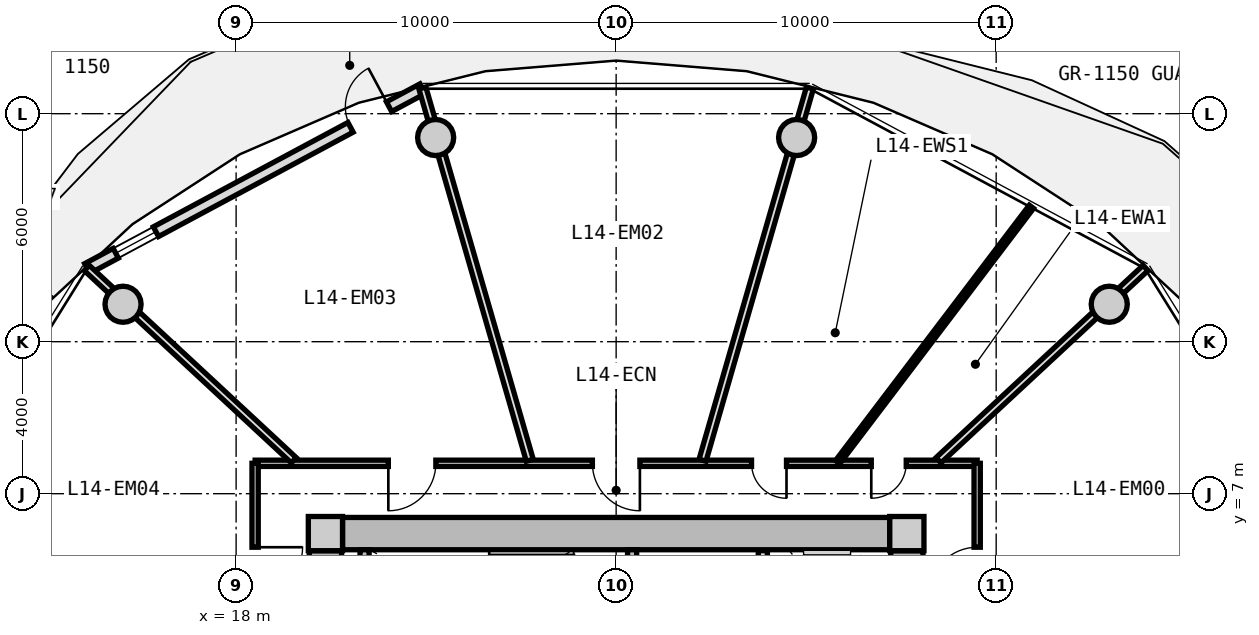
"""IFC4 building model, lengths in metres.
Left out: names, types, materials, properties, quantities, classifications, styles, units other than length and angle.
Written with IfcOpenShell. Run it as: python <this file> out.ifc"""

import sys

from ifc_helpers import new_model, si_unit, direction, frame, frame_2d, origin, origin_2d, place, context, subcontext, project, spatial, rectangle, circle, extrude, source, transform, mapped, element, fill, save


model = new_model("IFC4")
c1 = context("Model", 3, precision=1e-05, world=origin(), true_north=direction((0.0, 1.0)))
c2 = subcontext(c1, "Body", "Model", "MODEL_VIEW")
j1 = project(units=[si_unit("LENGTHUNIT", "METRE"), si_unit("PLANEANGLEUNIT", "RADIAN")], contexts=[c1])
p1 = place(None, origin())
s1 = spatial("IfcSite", under=j1, at=p1, CompositionType="ELEMENT")
p2 = place(p1, origin())
s2 = spatial("IfcBuilding", under=s1, at=p2, CompositionType="ELEMENT")
p3 = place(p2, frame((0.0, 0.0, 49.05)))
s3 = spatial("IfcBuildingStorey", under=s2, at=p3, CompositionType="ELEMENT", Elevation=49.05)
m1 = source(origin(), c2, "Body", "SweptSolid", [
    extrude(rectangle(XDim=0.9, YDim=0.9, at=origin_2d()), origin(), (0.0, 0.0, 1.0), 3.05),
])
for number, where, z_axis, x_axis in (
    (1, (35.65, 5.95, 0.0), (0.0, 0.0, 1.0), (1.0, 0.0, 0.0)),
    (2, (20.35, 5.95, 0.0), (0.0, 0.0, 1.0), (1.0, 0.0, 0.0)),
):
    element("IfcColumn", number, at=place(p3, frame(where, z_axis=z_axis, x_axis=x_axis)), inside=s3, PredefinedType="COLUMN", context=c2, shape_type="MappedRepresentation", body=[
        mapped(m1, transform((0.0, 0.0, 0.0), x_axis=(1.0, 0.0, 0.0), y_axis=(0.0, 1.0, 0.0), z_axis=(0.0, 0.0, 1.0), scale=1.0)),
    ])
m2 = source(origin(), c2, "Body", "SweptSolid", [
    extrude(rectangle(XDim=14.4, YDim=0.85, at=frame_2d((7.2, 0.0))), origin(), (0.0, 0.0, 1.0), 2.79),
])
p4 = place(p3, frame((20.8, 5.95, 0.0), z_axis=(0.0, 0.0, 1.0), x_axis=(1.0, 0.0, 0.0)))
e3 = element("IfcWall", 3, at=p4, inside=s3, PredefinedType="SHEAR", context=c2, shape_type="MappedRepresentation", body=[
    mapped(m2, transform((0.0, 0.0, 0.0), x_axis=(1.0, 0.0, 0.0), y_axis=(0.0, 1.0, 0.0), z_axis=(0.0, 0.0, 1.0), scale=1.0)),
])
m3 = source(origin(), c2, "Body", "SweptSolid", [
    extrude(rectangle(XDim=11.0, YDim=0.85, at=frame_2d((5.5, 0.0))), origin(), (0.0, 0.0, 1.0), 2.79),
])
p5 = place(p3, frame((20.35, -5.5, 0.0), z_axis=(0.0, 0.0, 1.0), x_axis=(0.0, 1.0, 0.0)))
e4 = element("IfcWall", 4, at=p5, inside=s3, PredefinedType="SHEAR", context=c2, shape_type="MappedRepresentation", body=[
    mapped(m3, transform((0.0, 0.0, 0.0), x_axis=(1.0, 0.0, 0.0), y_axis=(0.0, 1.0, 0.0), z_axis=(0.0, 0.0, 1.0), scale=1.0)),
])
p6 = place(p5, frame((3.8, 0.0, 0.0)))
e5 = element("IfcOpeningElement", 5, at=p6, cuts=e4, PredefinedType="OPENING", context=c2, shape_type="SweptSolid", body=[
    extrude(rectangle(XDim=1.2, YDim=2.15, at=frame_2d((0.6, 1.075))), frame((0.0, 0.435, 0.0), z_axis=(0.0, -1.0, 0.0), x_axis=(1.0, 0.0, 0.0)), (0.0, 0.0, 1.0), 0.87),
])
p7 = place(p3, frame((35.65, 5.5, 0.0), z_axis=(0.0, 0.0, 1.0), x_axis=(0.0, -1.0, 0.0)))
e6 = element("IfcWall", 6, at=p7, inside=s3, PredefinedType="SHEAR", context=c2, shape_type="MappedRepresentation", body=[
    mapped(m3, transform((0.0, 0.0, 0.0), x_axis=(1.0, 0.0, 0.0), y_axis=(0.0, 1.0, 0.0), z_axis=(0.0, 0.0, 1.0), scale=1.0)),
])
p8 = place(p7, frame((5.65, 0.0, 0.0)))
e7 = element("IfcOpeningElement", 7, at=p8, cuts=e6, PredefinedType="OPENING", context=c2, shape_type="SweptSolid", body=[
    extrude(rectangle(XDim=1.2, YDim=2.15, at=frame_2d((0.6, 1.075))), frame((0.0, 0.435, 0.0), z_axis=(0.0, -1.0, 0.0), x_axis=(1.0, 0.0, 0.0)), (0.0, 0.0, 1.0), 0.87),
])
m4 = source(origin(), c2, "Body", "SweptSolid", [
    extrude(circle(Radius=0.475, at=origin_2d()), origin(), (0.0, 0.0, 1.0), 3.05),
])
for number, where, z_axis, x_axis in (
    (8, (40.975, 11.985, 0.0), (0.0, 0.0, 1.0), (1.0, 0.0, 0.0)),
    (9, (32.749, 16.373, 0.0), (0.0, 0.0, 1.0), (1.0, 0.0, 0.0)),
    (10, (23.251, 16.373, 0.0), (0.0, 0.0, 1.0), (1.0, 0.0, 0.0)),
    (11, (15.025, 11.985, 0.0), (0.0, 0.0, 1.0), (1.0, 0.0, 0.0)),
):
    element("IfcColumn", number, at=place(p3, frame(where, z_axis=z_axis, x_axis=x_axis)), inside=s3, PredefinedType="COLUMN", context=c2, shape_type="MappedRepresentation", body=[
        mapped(m4, transform((0.0, 0.0, 0.0), x_axis=(1.0, 0.0, 0.0), y_axis=(0.0, 1.0, 0.0), z_axis=(0.0, 0.0, 1.0), scale=1.0)),
    ])
m5 = source(origin(), c2, "Body", "SweptSolid", [
    extrude(rectangle(XDim=10.011, YDim=0.29, at=frame_2d((5.005, 0.0))), origin(), (0.0, 0.0, 1.0), 2.79),
])
p9 = place(p3, frame((14.084, 12.926, 0.0), z_axis=(0.0, 0.0, 1.0), x_axis=(0.881272505317, 0.472608475773, 0.0)))
e12 = element("IfcWall", 12, at=p9, inside=s3, PredefinedType="SOLIDWALL", context=c2, shape_type="MappedRepresentation", body=[
    mapped(m5, transform((0.0, 0.0, 0.0), x_axis=(1.0, 0.0, 0.0), y_axis=(0.0, 1.0, 0.0), z_axis=(0.0, 0.0, 1.0), scale=1.0)),
])
p10 = place(p9, frame((7.86, 0.0, 0.0)))
e13 = element("IfcOpeningElement", 13, at=p10, cuts=e12, PredefinedType="OPENING", context=c2, shape_type="SweptSolid", body=[
    extrude(rectangle(XDim=1.15, YDim=2.25, at=frame_2d((0.575, 1.125))), frame((0.0, 0.155, 0.0), z_axis=(0.0, -1.0, 0.0), x_axis=(1.0, 0.0, 0.0)), (0.0, 0.0, 1.0), 0.31),
])
p11 = place(p9, frame((0.85, 0.0, 0.85)))
e14 = element("IfcOpeningElement", 14, at=p11, cuts=e12, PredefinedType="OPENING", context=c2, shape_type="SweptSolid", body=[
    extrude(rectangle(XDim=1.2, YDim=1.5, at=frame_2d((0.6, 0.75))), frame((0.0, 0.155, 0.0), z_axis=(0.0, -1.0, 0.0), x_axis=(1.0, 0.0, 0.0)), (0.0, 0.0, 1.0), 0.31),
])
m6 = source(origin(), c2, "Body", "SweptSolid", [
    extrude(rectangle(XDim=3.075, YDim=0.24, at=frame_2d((1.538, 0.0))), origin(), (0.0, 0.0, 1.0), 2.79),
])
p12 = place(p3, frame((21.38, 2.45, 0.0), z_axis=(0.0, 0.0, 1.0), x_axis=(0.0, 1.0, 0.0)))
e15 = element("IfcWall", 15, at=p12, inside=s3, PredefinedType="PARTITIONING", context=c2, shape_type="MappedRepresentation", body=[
    mapped(m6, transform((0.0, 0.0, 0.0), x_axis=(1.0, 0.0, 0.0), y_axis=(0.0, 1.0, 0.0), z_axis=(0.0, 0.0, 1.0), scale=1.0)),
])
p13 = place(p3, frame((28.42, 2.45, 0.0), z_axis=(0.0, 0.0, 1.0), x_axis=(0.0, 1.0, 0.0)))
e16 = element("IfcWall", 16, at=p13, inside=s3, PredefinedType="PARTITIONING", context=c2, shape_type="MappedRepresentation", body=[
    mapped(m6, transform((0.0, 0.0, 0.0), x_axis=(1.0, 0.0, 0.0), y_axis=(0.0, 1.0, 0.0), z_axis=(0.0, 0.0, 1.0), scale=1.0)),
])
p14 = place(p13, frame((0.55, 0.0, 0.0)))
e17 = element("IfcOpeningElement", 17, at=p14, cuts=e16, PredefinedType="OPENING", context=c2, shape_type="SweptSolid", body=[
    extrude(rectangle(XDim=1.1, YDim=2.15, at=frame_2d((0.55, 1.075))), frame((0.0, 0.13, 0.0), z_axis=(0.0, -1.0, 0.0), x_axis=(1.0, 0.0, 0.0)), (0.0, 0.0, 1.0), 0.26),
])
m7 = source(origin(), c2, "Body", "SweptSolid", [
    extrude(rectangle(XDim=5.0, YDim=0.24, at=frame_2d((2.5, 0.0))), origin(), (0.0, 0.0, 1.0), 2.775),
])
p15 = place(p3, frame((31.86, 0.5, 0.0), z_axis=(0.0, 0.0, 1.0), x_axis=(0.0, 1.0, 0.0)))
e18 = element("IfcWall", 18, at=p15, inside=s3, PredefinedType="PARTITIONING", context=c2, shape_type="MappedRepresentation", body=[
    mapped(m7, transform((0.0, 0.0, 0.0), x_axis=(1.0, 0.0, 0.0), y_axis=(0.0, 1.0, 0.0), z_axis=(0.0, 0.0, 1.0), scale=1.0)),
])
p16 = place(p15, frame((3.05, 0.0, 0.0)))
e19 = element("IfcOpeningElement", 19, at=p16, cuts=e18, PredefinedType="OPENING", context=c2, shape_type="SweptSolid", body=[
    extrude(rectangle(XDim=1.3, YDim=2.2, at=frame_2d((0.65, 1.1))), frame((0.0, 0.13, 0.0), z_axis=(0.0, -1.0, 0.0), x_axis=(1.0, 0.0, 0.0)), (0.0, 0.0, 1.0), 0.26),
])
p17 = place(p15, frame((0.55, 0.0, 0.0)))
e20 = element("IfcOpeningElement", 20, at=p17, cuts=e18, PredefinedType="OPENING", context=c2, shape_type="SweptSolid", body=[
    extrude(rectangle(XDim=1.3, YDim=2.2, at=frame_2d((0.65, 1.1))), frame((0.0, 0.13, 0.0), z_axis=(0.0, -1.0, 0.0), x_axis=(1.0, 0.0, 0.0)), (0.0, 0.0, 1.0), 0.26),
])
m8 = source(origin(), c2, "Body", "SweptSolid", [
    extrude(rectangle(XDim=19.0, YDim=0.165, at=frame_2d((9.5, 0.0))), origin(), (0.0, 0.0, 1.0), 2.775),
])
p18 = place(p3, frame((18.5, 7.8, 0.0), z_axis=(0.0, 0.0, 1.0), x_axis=(1.0, 0.0, 0.0)))
e21 = element("IfcWall", 21, at=p18, inside=s3, PredefinedType="PARTITIONING", context=c2, shape_type="MappedRepresentation", body=[
    mapped(m8, transform((0.0, 0.0, 0.0), x_axis=(1.0, 0.0, 0.0), y_axis=(0.0, 1.0, 0.0), z_axis=(0.0, 0.0, 1.0), scale=1.0)),
])
p19 = place(p18, frame((16.214, 0.0, 0.0)))
e22 = element("IfcOpeningElement", 22, at=p19, cuts=e21, PredefinedType="OPENING", context=c2, shape_type="SweptSolid", body=[
    extrude(rectangle(XDim=0.92, YDim=2.1, at=frame_2d((0.46, 1.05))), frame((0.0, 0.093, 0.0), z_axis=(0.0, -1.0, 0.0), x_axis=(1.0, 0.0, 0.0)), (0.0, 0.0, 1.0), 0.185),
])
p20 = place(p18, frame((13.063, 0.0, 0.0)))
e23 = element("IfcOpeningElement", 23, at=p20, cuts=e21, PredefinedType="OPENING", context=c2, shape_type="SweptSolid", body=[
    extrude(rectangle(XDim=0.92, YDim=2.1, at=frame_2d((0.46, 1.05))), frame((0.0, 0.093, 0.0), z_axis=(0.0, -1.0, 0.0), x_axis=(1.0, 0.0, 0.0)), (0.0, 0.0, 1.0), 0.185),
])
p21 = place(p18, frame((8.875, 0.0, 0.0)))
e24 = element("IfcOpeningElement", 24, at=p21, cuts=e21, PredefinedType="OPENING", context=c2, shape_type="SweptSolid", body=[
    extrude(rectangle(XDim=1.25, YDim=2.2, at=frame_2d((0.625, 1.1))), frame((0.0, 0.093, 0.0), z_axis=(0.0, -1.0, 0.0), x_axis=(1.0, 0.0, 0.0)), (0.0, 0.0, 1.0), 0.185),
])
p22 = place(p18, frame((3.506, 0.0, 0.0)))
e25 = element("IfcOpeningElement", 25, at=p22, cuts=e21, PredefinedType="OPENING", context=c2, shape_type="SweptSolid", body=[
    extrude(rectangle(XDim=1.25, YDim=2.2, at=frame_2d((0.625, 1.1))), frame((0.0, 0.093, 0.0), z_axis=(0.0, -1.0, 0.0), x_axis=(1.0, 0.0, 0.0)), (0.0, 0.0, 1.0), 0.185),
])
m9 = source(origin(), c2, "Body", "SweptSolid", [
    extrude(rectangle(XDim=15.6, YDim=0.165, at=frame_2d((7.8, 0.0))), origin(), (0.0, 0.0, 1.0), 2.775),
])
p23 = place(p3, frame((18.5, -7.8, 0.0), z_axis=(0.0, 0.0, 1.0), x_axis=(0.0, 1.0, 0.0)))
e26 = element("IfcWall", 26, at=p23, inside=s3, PredefinedType="PARTITIONING", context=c2, shape_type="MappedRepresentation", body=[
    mapped(m9, transform((0.0, 0.0, 0.0), x_axis=(1.0, 0.0, 0.0), y_axis=(0.0, 1.0, 0.0), z_axis=(0.0, 0.0, 1.0), scale=1.0)),
])
p24 = place(p23, frame((12.141, 0.0, 0.0)))
e27 = element("IfcOpeningElement", 27, at=p24, cuts=e26, PredefinedType="OPENING", context=c2, shape_type="SweptSolid", body=[
    extrude(rectangle(XDim=1.25, YDim=2.2, at=frame_2d((0.625, 1.1))), frame((0.0, 0.093, 0.0), z_axis=(0.0, -1.0, 0.0), x_axis=(1.0, 0.0, 0.0)), (0.0, 0.0, 1.0), 0.185),
])
p25 = place(p23, frame((7.175, 0.0, 0.0)))
e28 = element("IfcOpeningElement", 28, at=p25, cuts=e26, PredefinedType="OPENING", context=c2, shape_type="SweptSolid", body=[
    extrude(rectangle(XDim=1.25, YDim=2.2, at=frame_2d((0.625, 1.1))), frame((0.0, 0.093, 0.0), z_axis=(0.0, -1.0, 0.0), x_axis=(1.0, 0.0, 0.0)), (0.0, 0.0, 1.0), 0.185),
])
p26 = place(p23, frame((2.208, 0.0, 0.0)))
e29 = element("IfcOpeningElement", 29, at=p26, cuts=e26, PredefinedType="OPENING", context=c2, shape_type="SweptSolid", body=[
    extrude(rectangle(XDim=1.25, YDim=2.2, at=frame_2d((0.625, 1.1))), frame((0.0, 0.093, 0.0), z_axis=(0.0, -1.0, 0.0), x_axis=(1.0, 0.0, 0.0)), (0.0, 0.0, 1.0), 0.185),
])
p27 = place(p3, frame((37.5, 7.8, 0.0), z_axis=(0.0, 0.0, 1.0), x_axis=(0.0, -1.0, 0.0)))
e30 = element("IfcWall", 30, at=p27, inside=s3, PredefinedType="PARTITIONING", context=c2, shape_type="MappedRepresentation", body=[
    mapped(m9, transform((0.0, 0.0, 0.0), x_axis=(1.0, 0.0, 0.0), y_axis=(0.0, 1.0, 0.0), z_axis=(0.0, 0.0, 1.0), scale=1.0)),
])
p28 = place(p27, frame((8.835, 0.0, 0.0)))
e31 = element("IfcOpeningElement", 31, at=p28, cuts=e30, PredefinedType="OPENING", context=c2, shape_type="SweptSolid", body=[
    extrude(rectangle(XDim=1.05, YDim=2.15, at=frame_2d((0.525, 1.075))), frame((0.0, 0.093, 0.0), z_axis=(0.0, -1.0, 0.0), x_axis=(1.0, 0.0, 0.0)), (0.0, 0.0, 1.0), 0.185),
])
p29 = place(p27, frame((2.208, 0.0, 0.0)))
e32 = element("IfcOpeningElement", 32, at=p29, cuts=e30, PredefinedType="OPENING", context=c2, shape_type="SweptSolid", body=[
    extrude(rectangle(XDim=1.25, YDim=2.2, at=frame_2d((0.625, 1.1))), frame((0.0, 0.093, 0.0), z_axis=(0.0, -1.0, 0.0), x_axis=(1.0, 0.0, 0.0)), (0.0, 0.0, 1.0), 0.185),
])
m10 = source(origin(), c2, "Body", "SweptSolid", [
    extrude(rectangle(XDim=7.435, YDim=0.19, at=frame_2d((3.717, 0.0))), origin(), (0.0, 0.0, 1.0), 2.225),
])
for number, where, z_axis, x_axis in (
    (33, (19.517, 7.88, 0.0), (0.0, 0.0, 1.0), (-0.733, 0.681, 0.0)),
    (34, (36.483, 7.88, 0.0), (0.0, 0.0, 1.0), (0.733, 0.681, 0.0)),
):
    element("IfcWall", number, at=place(p3, frame(where, z_axis=z_axis, x_axis=x_axis)), inside=s3, PredefinedType="PARTITIONING", context=c2, shape_type="MappedRepresentation", body=[
        mapped(m10, transform((0.0, 0.0, 0.0), x_axis=(1.0, 0.0, 0.0), y_axis=(0.0, 1.0, 0.0), z_axis=(0.0, 0.0, 1.0), scale=1.0)),
    ])
m11 = source(origin(), c2, "Body", "SweptSolid", [
    extrude(rectangle(XDim=10.196, YDim=0.19, at=frame_2d((5.098, 0.0))), origin(), (0.0, 0.0, 1.0), 2.225),
])
p30 = place(p3, frame((30.273, 7.88, 0.0), z_axis=(0.0, 0.0, 1.0), x_axis=(0.277136420347, 0.960830580549, 0.0)))
e35 = element("IfcWall", 35, at=p30, inside=s3, PredefinedType="PARTITIONING", context=c2, shape_type="MappedRepresentation", body=[
    mapped(m11, transform((0.0, 0.0, 0.0), x_axis=(1.0, 0.0, 0.0), y_axis=(0.0, 1.0, 0.0), z_axis=(0.0, 0.0, 1.0), scale=1.0)),
])
m12 = source(origin(), c2, "Body", "SweptSolid", [
    extrude(rectangle(XDim=8.436, YDim=0.14, at=frame_2d((4.218, 0.0))), origin(), (0.0, 0.0, 1.0), 2.775),
])
p31 = place(p3, frame((33.828, 7.83, 0.0), z_axis=(0.0, 0.0, 1.0), x_axis=(0.604486552388, 0.796615345058, 0.0)))
e36 = element("IfcWall", 36, at=p31, inside=s3, PredefinedType="PARTITIONING", context=c2, shape_type="MappedRepresentation", body=[
    mapped(m12, transform((0.0, 0.0, 0.0), x_axis=(1.0, 0.0, 0.0), y_axis=(0.0, 1.0, 0.0), z_axis=(0.0, 0.0, 1.0), scale=1.0)),
])
p32 = place(p3, frame((25.727, 7.88, 0.0), z_axis=(0.0, 0.0, 1.0), x_axis=(-0.277136420347, 0.960830580549, 0.0)))
e37 = element("IfcWall", 37, at=p32, inside=s3, PredefinedType="PARTITIONING", context=c2, shape_type="MappedRepresentation", body=[
    mapped(m11, transform((0.0, 0.0, 0.0), x_axis=(1.0, 0.0, 0.0), y_axis=(0.0, 1.0, 0.0), z_axis=(0.0, 0.0, 1.0), scale=1.0)),
])
m13 = source(origin(), c2, "Body", "SweptSolid", [
    extrude(rectangle(XDim=1.15, YDim=2.25, at=frame_2d((0.575, 1.125))), frame((0.0, 0.025, 0.0), z_axis=(0.0, -1.0, 0.0), x_axis=(1.0, 0.0, 0.0)), (0.0, 0.0, 1.0), 0.05),
])
p33 = place(p10, origin())
e38 = element("IfcDoor", 38, at=p33, inside=s3, OperationType="SINGLE_SWING_RIGHT", PredefinedType="DOOR", context=c2, shape_type="MappedRepresentation", body=[
    mapped(m13, transform((0.0, 0.0, 0.0), x_axis=(1.0, 0.0, 0.0), y_axis=(0.0, 1.0, 0.0), z_axis=(0.0, 0.0, 1.0), scale=1.0)),
])
fill(e13, e38)
m14 = source(origin(), c2, "Body", "SweptSolid", [
    extrude(rectangle(XDim=1.2, YDim=1.5, at=frame_2d((0.6, 0.75))), frame((0.0, 0.03, 0.0), z_axis=(0.0, -1.0, 0.0), x_axis=(1.0, 0.0, 0.0)), (0.0, 0.0, 1.0), 0.06),
])
p34 = place(p11, origin())
e39 = element("IfcWindow", 39, at=p34, inside=s3, PartitioningType="SINGLE_PANEL", PredefinedType="WINDOW", context=c2, shape_type="MappedRepresentation", body=[
    mapped(m14, transform((0.0, 0.0, 0.0), x_axis=(1.0, 0.0, 0.0), y_axis=(0.0, 1.0, 0.0), z_axis=(0.0, 0.0, 1.0), scale=1.0)),
])
fill(e14, e39)
m15 = source(origin(), c2, "Body", "SweptSolid", [
    extrude(rectangle(XDim=1.25, YDim=2.2, at=frame_2d((0.625, 1.1))), frame((0.0, 0.025, 0.0), z_axis=(0.0, -1.0, 0.0), x_axis=(1.0, 0.0, 0.0)), (0.0, 0.0, 1.0), 0.05),
])
p35 = place(p24, frame((1.25, 0.0, 0.0), z_axis=(0.0, 0.0, 1.0), x_axis=(-1.0, 0.0, 0.0)))
e40 = element("IfcDoor", 40, at=p35, inside=s3, OperationType="SINGLE_SWING_LEFT", PredefinedType="DOOR", context=c2, shape_type="MappedRepresentation", body=[
    mapped(m15, transform((0.0, 0.0, 0.0), x_axis=(1.0, 0.0, 0.0), y_axis=(0.0, 1.0, 0.0), z_axis=(0.0, 0.0, 1.0), scale=1.0)),
])
fill(e27, e40)
p36 = place(p29, frame((1.25, 0.0, 0.0), z_axis=(0.0, 0.0, 1.0), x_axis=(-1.0, 0.0, 0.0)))
e41 = element("IfcDoor", 41, at=p36, inside=s3, OperationType="SINGLE_SWING_LEFT", PredefinedType="DOOR", context=c2, shape_type="MappedRepresentation", body=[
    mapped(m15, transform((0.0, 0.0, 0.0), x_axis=(1.0, 0.0, 0.0), y_axis=(0.0, 1.0, 0.0), z_axis=(0.0, 0.0, 1.0), scale=1.0)),
])
fill(e32, e41)
m16 = source(origin(), c2, "Body", "SweptSolid", [
    extrude(rectangle(XDim=0.92, YDim=2.1, at=frame_2d((0.46, 1.05))), frame((0.0, 0.025, 0.0), z_axis=(0.0, -1.0, 0.0), x_axis=(1.0, 0.0, 0.0)), (0.0, 0.0, 1.0), 0.05),
])
p37 = place(p19, frame((0.92, 0.0, 0.0), z_axis=(0.0, 0.0, 1.0), x_axis=(-1.0, 0.0, 0.0)))
e42 = element("IfcDoor", 42, at=p37, inside=s3, OperationType="SINGLE_SWING_RIGHT", PredefinedType="DOOR", context=c2, shape_type="MappedRepresentation", body=[
    mapped(m16, transform((0.0, 0.0, 0.0), x_axis=(1.0, 0.0, 0.0), y_axis=(0.0, 1.0, 0.0), z_axis=(0.0, 0.0, 1.0), scale=1.0)),
])
fill(e22, e42)
p38 = place(p20, frame((0.92, 0.0, 0.0), z_axis=(0.0, 0.0, 1.0), x_axis=(-1.0, 0.0, 0.0)))
e43 = element("IfcDoor", 43, at=p38, inside=s3, OperationType="SINGLE_SWING_LEFT", PredefinedType="DOOR", context=c2, shape_type="MappedRepresentation", body=[
    mapped(m16, transform((0.0, 0.0, 0.0), x_axis=(1.0, 0.0, 0.0), y_axis=(0.0, 1.0, 0.0), z_axis=(0.0, 0.0, 1.0), scale=1.0)),
])
fill(e23, e43)
p39 = place(p21, frame((1.25, 0.0, 0.0), z_axis=(0.0, 0.0, 1.0), x_axis=(-1.0, 0.0, 0.0)))
e44 = element("IfcDoor", 44, at=p39, inside=s3, OperationType="SINGLE_SWING_LEFT", PredefinedType="DOOR", context=c2, shape_type="MappedRepresentation", body=[
    mapped(m15, transform((0.0, 0.0, 0.0), x_axis=(1.0, 0.0, 0.0), y_axis=(0.0, 1.0, 0.0), z_axis=(0.0, 0.0, 1.0), scale=1.0)),
])
fill(e24, e44)
p40 = place(p22, frame((1.25, 0.0, 0.0), z_axis=(0.0, 0.0, 1.0), x_axis=(-1.0, 0.0, 0.0)))
e45 = element("IfcDoor", 45, at=p40, inside=s3, OperationType="SINGLE_SWING_RIGHT", PredefinedType="DOOR", context=c2, shape_type="MappedRepresentation", body=[
    mapped(m15, transform((0.0, 0.0, 0.0), x_axis=(1.0, 0.0, 0.0), y_axis=(0.0, 1.0, 0.0), z_axis=(0.0, 0.0, 1.0), scale=1.0)),
])
fill(e25, e45)
save(model, sys.argv[1])
